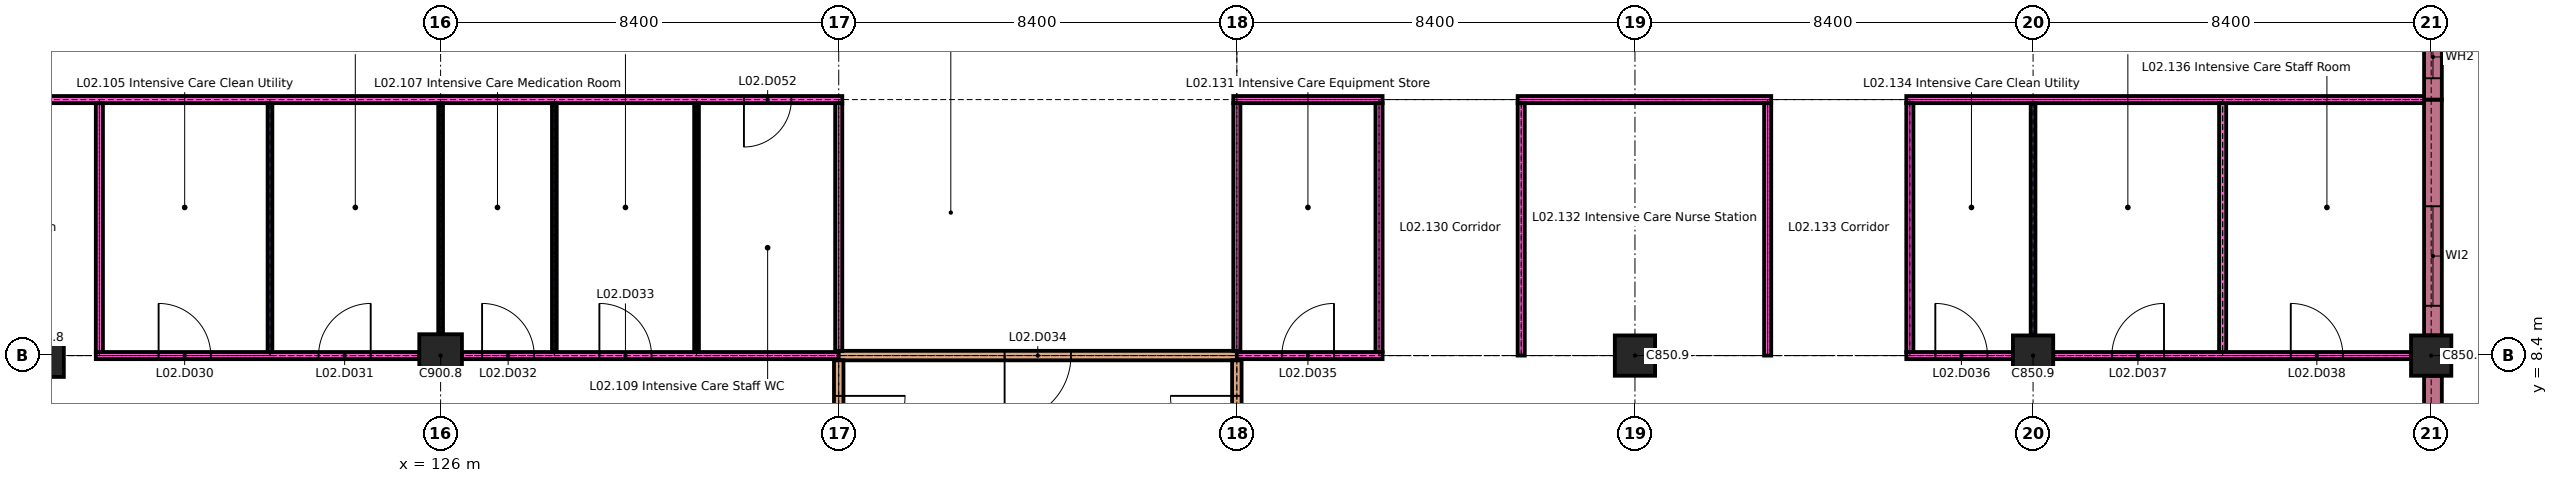
"""IFC4 building model, lengths in metres.
Left out: names, types, materials, properties, quantities, classifications, styles, units other than length and angle.
Written with IfcOpenShell. Run it as: python <this file> out.ifc"""

import sys

from ifc_helpers import new_model, si_unit, direction, frame, frame_2d, origin, origin_2d, place, context, subcontext, project, spatial, rectangle, extrude, element, fill, save


model = new_model("IFC4")
c1 = context("Model", 3, precision=1e-05, world=origin(), true_north=direction((0.0, 1.0)))
c2 = subcontext(c1, "Body", "Model", "MODEL_VIEW")
j1 = project(units=[si_unit("LENGTHUNIT", "METRE"), si_unit("PLANEANGLEUNIT", "RADIAN")], contexts=[c1])
p1 = place(None, origin())
s1 = spatial("IfcSite", under=j1, at=p1, CompositionType="ELEMENT")
p2 = place(p1, origin())
s2 = spatial("IfcBuilding", under=s1, at=p2, CompositionType="ELEMENT")
p3 = place(p2, frame((0.0, 0.0, 8.4)))
s3 = spatial("IfcBuildingStorey", under=s2, at=p3, CompositionType="ELEMENT", Elevation=8.4)
for number, where, z_axis, x_axis in (
    (1, (117.6, 8.4, 0.0), (0.0, 0.0, 1.0), (1.0, 0.0, 0.0)),
    (2, (126.0, 8.4, 0.0), (0.0, 0.0, 1.0), (1.0, 0.0, 0.0)),
):
    element("IfcColumn", number, at=place(p3, frame(where, z_axis=z_axis, x_axis=x_axis)), inside=s3, PredefinedType="COLUMN", context=c2, shape_type="SweptSolid", body=[
        extrude(rectangle(XDim=0.9, YDim=0.9, at=origin_2d()), origin(), (0.0, 0.0, 1.0), 4.2),
    ])
for number, where, z_axis, x_axis in (
    (3, (151.2, 8.4, 0.0), (0.0, 0.0, 1.0), (1.0, 0.0, 0.0)),
    (4, (159.6, 8.4, 0.0), (0.0, 0.0, 1.0), (1.0, 0.0, 0.0)),
    (5, (168.0, 8.4, 0.0), (0.0, 0.0, 1.0), (1.0, 0.0, 0.0)),
):
    element("IfcColumn", number, at=place(p3, frame(where, z_axis=z_axis, x_axis=x_axis)), inside=s3, PredefinedType="COLUMN", context=c2, shape_type="SweptSolid", body=[
        extrude(rectangle(XDim=0.85, YDim=0.85, at=origin_2d()), origin(), (0.0, 0.0, 1.0), 4.2),
    ])
p4 = place(p3, frame((168.038, 5.4, 0.0), z_axis=(0.0, 0.0, 1.0), x_axis=(0.0, 1.0, 0.0)))
e6 = element("IfcWall", 6, at=p4, inside=s3, PredefinedType="SOLIDWALL", context=c2, shape_type="SweptSolid", body=[
    extrude(rectangle(XDim=2.575, YDim=0.375, at=frame_2d((1.288, 0.0))), origin(), (0.0, 0.0, 1.0), 3.9),
])
p5 = place(p4, frame((0.45, 0.0, 0.9)))
e7 = element("IfcOpeningElement", 7, at=p5, cuts=e6, PredefinedType="OPENING", context=c2, shape_type="SweptSolid", body=[
    extrude(rectangle(XDim=0.9, YDim=2.1, at=frame_2d((0.45, 1.05))), frame((0.0, 0.198, 0.0), z_axis=(0.0, -1.0, 0.0), x_axis=(1.0, 0.0, 0.0)), (0.0, 0.0, 1.0), 0.395),
])
p6 = place(p3, frame((168.038, 8.825, 0.0), z_axis=(0.0, 0.0, 1.0), x_axis=(0.0, 1.0, 0.0)))
e8 = element("IfcWall", 8, at=p6, inside=s3, PredefinedType="SOLIDWALL", context=c2, shape_type="SweptSolid", body=[
    extrude(rectangle(XDim=4.975, YDim=0.375, at=frame_2d((2.488, 0.0))), origin(), (0.0, 0.0, 1.0), 3.9),
])
p7 = place(p6, frame((0.625, 0.0, 0.9)))
e9 = element("IfcOpeningElement", 9, at=p7, cuts=e8, PredefinedType="OPENING", context=c2, shape_type="SweptSolid", body=[
    extrude(rectangle(XDim=2.1, YDim=2.1, at=frame_2d((1.05, 1.05))), frame((0.0, 0.198, 0.0), z_axis=(0.0, -1.0, 0.0), x_axis=(1.0, 0.0, 0.0)), (0.0, 0.0, 1.0), 0.395),
])
p8 = place(p3, frame((168.038, 13.8, 0.0), z_axis=(0.0, 0.0, 1.0), x_axis=(0.0, 1.0, 0.0)))
e10 = element("IfcWall", 10, at=p8, inside=s3, PredefinedType="SOLIDWALL", context=c2, shape_type="SweptSolid", body=[
    extrude(rectangle(XDim=3.0, YDim=0.375, at=frame_2d((1.5, 0.0))), origin(), (0.0, 0.0, 1.0), 3.9),
])
p9 = place(p8, frame((0.45, 0.0, 0.9)))
e11 = element("IfcOpeningElement", 11, at=p9, cuts=e10, PredefinedType="OPENING", context=c2, shape_type="SweptSolid", body=[
    extrude(rectangle(XDim=0.9, YDim=2.1, at=frame_2d((0.45, 1.05))), frame((0.0, 0.198, 0.0), z_axis=(0.0, -1.0, 0.0), x_axis=(1.0, 0.0, 0.0)), (0.0, 0.0, 1.0), 0.395),
])
p10 = place(p3, frame((118.725, 8.4, 0.0), z_axis=(0.0, 0.0, 1.0), x_axis=(1.0, 0.0, 0.0)))
e12 = element("IfcWall", 12, at=p10, inside=s3, PredefinedType="PARTITIONING", context=c2, shape_type="SweptSolid", body=[
    extrude(rectangle(XDim=6.825, YDim=0.15, at=frame_2d((3.413, 0.0))), origin(), (0.0, 0.0, 1.0), 4.2),
])
p11 = place(p10, frame((1.325, 0.0, 0.0)))
e13 = element("IfcOpeningElement", 13, at=p11, cuts=e12, PredefinedType="OPENING", context=c2, shape_type="SweptSolid", body=[
    extrude(rectangle(XDim=1.1, YDim=2.1, at=frame_2d((0.55, 1.05))), frame((0.0, 0.085, 0.0), z_axis=(0.0, -1.0, 0.0), x_axis=(1.0, 0.0, 0.0)), (0.0, 0.0, 1.0), 0.17),
])
p12 = place(p10, frame((4.7, 0.0, 0.0)))
e14 = element("IfcOpeningElement", 14, at=p12, cuts=e12, PredefinedType="OPENING", context=c2, shape_type="SweptSolid", body=[
    extrude(rectangle(XDim=1.1, YDim=2.1, at=frame_2d((0.55, 1.05))), frame((0.0, 0.085, 0.0), z_axis=(0.0, -1.0, 0.0), x_axis=(1.0, 0.0, 0.0)), (0.0, 0.0, 1.0), 0.17),
])
p13 = place(p3, frame((126.45, 8.4, 0.0), z_axis=(0.0, 0.0, 1.0), x_axis=(1.0, 0.0, 0.0)))
e15 = element("IfcWall", 15, at=p13, inside=s3, PredefinedType="PARTITIONING", context=c2, shape_type="SweptSolid", body=[
    extrude(rectangle(XDim=7.95, YDim=0.15, at=frame_2d((3.975, 0.0))), origin(), (0.0, 0.0, 1.0), 4.2),
])
p14 = place(p13, frame((0.425, 0.0, 0.0)))
e16 = element("IfcOpeningElement", 16, at=p14, cuts=e15, PredefinedType="OPENING", context=c2, shape_type="SweptSolid", body=[
    extrude(rectangle(XDim=1.1, YDim=2.1, at=frame_2d((0.55, 1.05))), frame((0.0, 0.085, 0.0), z_axis=(0.0, -1.0, 0.0), x_axis=(1.0, 0.0, 0.0)), (0.0, 0.0, 1.0), 0.17),
])
p15 = place(p13, frame((2.9, 0.0, 0.0)))
e17 = element("IfcOpeningElement", 17, at=p15, cuts=e15, PredefinedType="OPENING", context=c2, shape_type="SweptSolid", body=[
    extrude(rectangle(XDim=1.1, YDim=2.1, at=frame_2d((0.55, 1.05))), frame((0.0, 0.085, 0.0), z_axis=(0.0, -1.0, 0.0), x_axis=(1.0, 0.0, 0.0)), (0.0, 0.0, 1.0), 0.17),
])
p16 = place(p3, frame((134.4, 8.4, 0.0), z_axis=(0.0, 0.0, 1.0), x_axis=(1.0, 0.0, 0.0)))
e18 = element("IfcWall", 18, at=p16, inside=s3, PredefinedType="PARTITIONING", context=c2, shape_type="SweptSolid", body=[
    extrude(rectangle(XDim=8.4, YDim=0.2, at=frame_2d((4.2, 0.0))), origin(), (0.0, 0.0, 1.0), 4.2),
])
p17 = place(p16, frame((3.5, 0.0, 0.0)))
e19 = element("IfcOpeningElement", 19, at=p17, cuts=e18, PredefinedType="OPENING", context=c2, shape_type="SweptSolid", body=[
    extrude(rectangle(XDim=1.4, YDim=2.1, at=frame_2d((0.7, 1.05))), frame((0.0, 0.11, 0.0), z_axis=(0.0, -1.0, 0.0), x_axis=(1.0, 0.0, 0.0)), (0.0, 0.0, 1.0), 0.22),
])
p18 = place(p3, frame((142.8, 8.4, 0.0), z_axis=(0.0, 0.0, 1.0), x_axis=(1.0, 0.0, 0.0)))
e20 = element("IfcWall", 20, at=p18, inside=s3, PredefinedType="PARTITIONING", context=c2, shape_type="SweptSolid", body=[
    extrude(rectangle(XDim=3.075, YDim=0.15, at=frame_2d((1.538, 0.0))), origin(), (0.0, 0.0, 1.0), 4.2),
])
p19 = place(p18, frame((0.95, 0.0, 0.0)))
e21 = element("IfcOpeningElement", 21, at=p19, cuts=e20, PredefinedType="OPENING", context=c2, shape_type="SweptSolid", body=[
    extrude(rectangle(XDim=1.1, YDim=2.1, at=frame_2d((0.55, 1.05))), frame((0.0, 0.085, 0.0), z_axis=(0.0, -1.0, 0.0), x_axis=(1.0, 0.0, 0.0)), (0.0, 0.0, 1.0), 0.17),
])
p20 = place(p3, frame((156.925, 8.4, 0.0), z_axis=(0.0, 0.0, 1.0), x_axis=(1.0, 0.0, 0.0)))
e22 = element("IfcWall", 22, at=p20, inside=s3, PredefinedType="PARTITIONING", context=c2, shape_type="SweptSolid", body=[
    extrude(rectangle(XDim=2.25, YDim=0.15, at=frame_2d((1.125, 0.0))), origin(), (0.0, 0.0, 1.0), 4.2),
])
p21 = place(p20, frame((0.613, 0.0, 0.0)))
e23 = element("IfcOpeningElement", 23, at=p21, cuts=e22, PredefinedType="OPENING", context=c2, shape_type="SweptSolid", body=[
    extrude(rectangle(XDim=1.1, YDim=2.1, at=frame_2d((0.55, 1.05))), frame((0.0, 0.085, 0.0), z_axis=(0.0, -1.0, 0.0), x_axis=(1.0, 0.0, 0.0)), (0.0, 0.0, 1.0), 0.17),
])
p22 = place(p3, frame((160.025, 8.4, 0.0), z_axis=(0.0, 0.0, 1.0), x_axis=(1.0, 0.0, 0.0)))
e24 = element("IfcWall", 24, at=p22, inside=s3, PredefinedType="PARTITIONING", context=c2, shape_type="SweptSolid", body=[
    extrude(rectangle(XDim=7.55, YDim=0.15, at=frame_2d((3.775, 0.0))), origin(), (0.0, 0.0, 1.0), 4.2),
])
p23 = place(p22, frame((1.238, 0.0, 0.0)))
e25 = element("IfcOpeningElement", 25, at=p23, cuts=e24, PredefinedType="OPENING", context=c2, shape_type="SweptSolid", body=[
    extrude(rectangle(XDim=1.1, YDim=2.1, at=frame_2d((0.55, 1.05))), frame((0.0, 0.085, 0.0), z_axis=(0.0, -1.0, 0.0), x_axis=(1.0, 0.0, 0.0)), (0.0, 0.0, 1.0), 0.17),
])
p24 = place(p22, frame((5.012, 0.0, 0.0)))
e26 = element("IfcOpeningElement", 26, at=p24, cuts=e24, PredefinedType="OPENING", context=c2, shape_type="SweptSolid", body=[
    extrude(rectangle(XDim=1.1, YDim=2.1, at=frame_2d((0.55, 1.05))), frame((0.0, 0.085, 0.0), z_axis=(0.0, -1.0, 0.0), x_axis=(1.0, 0.0, 0.0)), (0.0, 0.0, 1.0), 0.17),
])
p25 = place(p3, frame((112.125, 13.8, 0.0), z_axis=(0.0, 0.0, 1.0), x_axis=(1.0, 0.0, 0.0)))
e27 = element("IfcWall", 27, at=p25, inside=s3, PredefinedType="PARTITIONING", context=c2, shape_type="SweptSolid", body=[
    extrude(rectangle(XDim=22.35, YDim=0.15, at=frame_2d((11.175, 0.0))), origin(), (0.0, 0.0, 1.0), 4.2),
])
p26 = place(p25, frame((20.275, 0.0, 0.0)))
e28 = element("IfcOpeningElement", 28, at=p26, cuts=e27, PredefinedType="OPENING", context=c2, shape_type="SweptSolid", body=[
    extrude(rectangle(XDim=1.0, YDim=2.1, at=frame_2d((0.5, 1.05))), frame((0.0, 0.085, 0.0), z_axis=(0.0, -1.0, 0.0), x_axis=(1.0, 0.0, 0.0)), (0.0, 0.0, 1.0), 0.17),
])
p27 = place(p3, frame((142.725, 13.8, 0.0), z_axis=(0.0, 0.0, 1.0), x_axis=(1.0, 0.0, 0.0)))
e29 = element("IfcWall", 29, at=p27, inside=s3, PredefinedType="PARTITIONING", context=c2, shape_type="SweptSolid", body=[
    extrude(rectangle(XDim=3.15, YDim=0.15, at=frame_2d((1.575, 0.0))), origin(), (0.0, 0.0, 1.0), 4.2),
])
p28 = place(p3, frame((148.725, 13.8, 0.0), z_axis=(0.0, 0.0, 1.0), x_axis=(1.0, 0.0, 0.0)))
e30 = element("IfcWall", 30, at=p28, inside=s3, PredefinedType="PARTITIONING", context=c2, shape_type="SweptSolid", body=[
    extrude(rectangle(XDim=5.35, YDim=0.15, at=frame_2d((2.675, 0.0))), origin(), (0.0, 0.0, 1.0), 4.2),
])
p29 = place(p3, frame((156.925, 13.8, 0.0), z_axis=(0.0, 0.0, 1.0), x_axis=(1.0, 0.0, 0.0)))
e31 = element("IfcWall", 31, at=p29, inside=s3, PredefinedType="PARTITIONING", context=c2, shape_type="SweptSolid", body=[
    extrude(rectangle(XDim=10.925, YDim=0.15, at=frame_2d((5.462, 0.0))), origin(), (0.0, 0.0, 1.0), 4.2),
])
p30 = place(p3, frame((118.8, 8.475, 0.0), z_axis=(0.0, 0.0, 1.0), x_axis=(0.0, 1.0, 0.0)))
e32 = element("IfcWall", 32, at=p30, inside=s3, PredefinedType="PARTITIONING", context=c2, shape_type="SweptSolid", body=[
    extrude(rectangle(XDim=5.25, YDim=0.15, at=frame_2d((2.625, 0.0))), origin(), (0.0, 0.0, 1.0), 4.2),
])
p31 = place(p3, frame((122.4, 8.475, 0.0), z_axis=(0.0, 0.0, 1.0), x_axis=(0.0, 1.0, 0.0)))
e33 = element("IfcWall", 33, at=p31, inside=s3, PredefinedType="PARTITIONING", context=c2, shape_type="SweptSolid", body=[
    extrude(rectangle(XDim=5.25, YDim=0.1, at=frame_2d((2.625, 0.0))), origin(), (0.0, 0.0, 1.0), 4.2),
])
p32 = place(p3, frame((126.0, 8.85, 0.0), z_axis=(0.0, 0.0, 1.0), x_axis=(0.0, 1.0, 0.0)))
e34 = element("IfcWall", 34, at=p32, inside=s3, PredefinedType="PARTITIONING", context=c2, shape_type="SweptSolid", body=[
    extrude(rectangle(XDim=4.875, YDim=0.1, at=frame_2d((2.438, 0.0))), origin(), (0.0, 0.0, 1.0), 4.2),
])
for number, where, z_axis, x_axis in (
    (35, (128.4, 8.475, 0.0), (0.0, 0.0, 1.0), (0.0, 1.0, 0.0)),
    (36, (131.4, 8.475, 0.0), (0.0, 0.0, 1.0), (0.0, 1.0, 0.0)),
):
    element("IfcWall", number, at=place(p3, frame(where, z_axis=z_axis, x_axis=x_axis)), inside=s3, PredefinedType="PARTITIONING", context=c2, shape_type="SweptSolid", body=[
        extrude(rectangle(XDim=5.25, YDim=0.1, at=frame_2d((2.625, 0.0))), origin(), (0.0, 0.0, 1.0), 4.2),
    ])
p33 = place(p3, frame((134.4, 3.6, 0.0), z_axis=(0.0, 0.0, 1.0), x_axis=(0.0, 1.0, 0.0)))
e37 = element("IfcWall", 37, at=p33, inside=s3, PredefinedType="PARTITIONING", context=c2, shape_type="SweptSolid", body=[
    extrude(rectangle(XDim=4.7, YDim=0.2, at=frame_2d((2.35, 0.0))), origin(), (0.0, 0.0, 1.0), 4.2),
])
p34 = place(p33, frame((2.55, 0.0, 0.0)))
e38 = element("IfcOpeningElement", 38, at=p34, cuts=e37, PredefinedType="OPENING", context=c2, shape_type="SweptSolid", body=[
    extrude(rectangle(XDim=1.4, YDim=2.1, at=frame_2d((0.7, 1.05))), frame((0.0, 0.11, 0.0), z_axis=(0.0, -1.0, 0.0), x_axis=(1.0, 0.0, 0.0)), (0.0, 0.0, 1.0), 0.22),
])
p35 = place(p3, frame((134.4, 8.5, 0.0), z_axis=(0.0, 0.0, 1.0), x_axis=(0.0, 1.0, 0.0)))
e39 = element("IfcWall", 39, at=p35, inside=s3, PredefinedType="PARTITIONING", context=c2, shape_type="SweptSolid", body=[
    extrude(rectangle(XDim=5.225, YDim=0.15, at=frame_2d((2.613, 0.0))), origin(), (0.0, 0.0, 1.0), 4.2),
])
p36 = place(p3, frame((142.8, 3.6, 0.0), z_axis=(0.0, 0.0, 1.0), x_axis=(0.0, 1.0, 0.0)))
e40 = element("IfcWall", 40, at=p36, inside=s3, PredefinedType="PARTITIONING", context=c2, shape_type="SweptSolid", body=[
    extrude(rectangle(XDim=4.7, YDim=0.2, at=frame_2d((2.35, 0.0))), origin(), (0.0, 0.0, 1.0), 4.2),
])
p37 = place(p36, frame((2.55, 0.0, 0.0)))
e41 = element("IfcOpeningElement", 41, at=p37, cuts=e40, PredefinedType="OPENING", context=c2, shape_type="SweptSolid", body=[
    extrude(rectangle(XDim=1.4, YDim=2.1, at=frame_2d((0.7, 1.05))), frame((0.0, 0.11, 0.0), z_axis=(0.0, -1.0, 0.0), x_axis=(1.0, 0.0, 0.0)), (0.0, 0.0, 1.0), 0.22),
])
p38 = place(p3, frame((142.8, 8.5, 0.0), z_axis=(0.0, 0.0, 1.0), x_axis=(0.0, 1.0, 0.0)))
e42 = element("IfcWall", 42, at=p38, inside=s3, PredefinedType="PARTITIONING", context=c2, shape_type="SweptSolid", body=[
    extrude(rectangle(XDim=5.225, YDim=0.15, at=frame_2d((2.613, 0.0))), origin(), (0.0, 0.0, 1.0), 4.2),
])
p39 = place(p3, frame((145.8, 8.475, 0.0), z_axis=(0.0, 0.0, 1.0), x_axis=(0.0, 1.0, 0.0)))
e43 = element("IfcWall", 43, at=p39, inside=s3, PredefinedType="PARTITIONING", context=c2, shape_type="SweptSolid", body=[
    extrude(rectangle(XDim=5.25, YDim=0.15, at=frame_2d((2.625, 0.0))), origin(), (0.0, 0.0, 1.0), 4.2),
])
for number, where, z_axis, x_axis in (
    (44, (148.8, 8.4, 0.0), (0.0, 0.0, 1.0), (0.0, 1.0, 0.0)),
    (45, (154.0, 8.4, 0.0), (0.0, 0.0, 1.0), (0.0, 1.0, 0.0)),
):
    element("IfcWall", number, at=place(p3, frame(where, z_axis=z_axis, x_axis=x_axis)), inside=s3, PredefinedType="PARTITIONING", context=c2, shape_type="SweptSolid", body=[
        extrude(rectangle(XDim=5.325, YDim=0.15, at=frame_2d((2.663, 0.0))), origin(), (0.0, 0.0, 1.0), 4.2),
    ])
p40 = place(p3, frame((157.0, 8.475, 0.0), z_axis=(0.0, 0.0, 1.0), x_axis=(0.0, 1.0, 0.0)))
e46 = element("IfcWall", 46, at=p40, inside=s3, PredefinedType="PARTITIONING", context=c2, shape_type="SweptSolid", body=[
    extrude(rectangle(XDim=5.25, YDim=0.15, at=frame_2d((2.625, 0.0))), origin(), (0.0, 0.0, 1.0), 4.2),
])
p41 = place(p3, frame((159.6, 8.825, 0.0), z_axis=(0.0, 0.0, 1.0), x_axis=(0.0, 1.0, 0.0)))
e47 = element("IfcWall", 47, at=p41, inside=s3, PredefinedType="PARTITIONING", context=c2, shape_type="SweptSolid", body=[
    extrude(rectangle(XDim=4.9, YDim=0.1, at=frame_2d((2.45, 0.0))), origin(), (0.0, 0.0, 1.0), 4.2),
])
p42 = place(p3, frame((163.6, 8.475, 0.0), z_axis=(0.0, 0.0, 1.0), x_axis=(0.0, 1.0, 0.0)))
e48 = element("IfcWall", 48, at=p42, inside=s3, PredefinedType="PARTITIONING", context=c2, shape_type="SweptSolid", body=[
    extrude(rectangle(XDim=5.25, YDim=0.15, at=frame_2d((2.625, 0.0))), origin(), (0.0, 0.0, 1.0), 4.2),
])
p43 = place(p7, origin())
e49 = element("IfcWindow", 49, at=p43, inside=s3, PartitioningType="SINGLE_PANEL", PredefinedType="WINDOW", context=c2, shape_type="SweptSolid", body=[
    extrude(rectangle(XDim=2.1, YDim=2.1, at=frame_2d((1.05, 1.05))), frame((0.0, 0.045, 0.0), z_axis=(0.0, -1.0, 0.0), x_axis=(1.0, 0.0, 0.0)), (0.0, 0.0, 1.0), 0.09),
])
fill(e9, e49)
p44 = place(p9, origin())
e50 = element("IfcWindow", 50, at=p44, inside=s3, PartitioningType="SINGLE_PANEL", PredefinedType="WINDOW", context=c2, shape_type="SweptSolid", body=[
    extrude(rectangle(XDim=0.9, YDim=2.1, at=frame_2d((0.45, 1.05))), frame((0.0, 0.03, 0.0), z_axis=(0.0, -1.0, 0.0), x_axis=(1.0, 0.0, 0.0)), (0.0, 0.0, 1.0), 0.06),
])
fill(e11, e50)
p45 = place(p11, origin())
e51 = element("IfcDoor", 51, at=p45, inside=s3, OperationType="SINGLE_SWING_RIGHT", PredefinedType="DOOR", context=c2, shape_type="SweptSolid", body=[
    extrude(rectangle(XDim=1.1, YDim=2.1, at=frame_2d((0.55, 1.05))), frame((0.0, 0.025, 0.0), z_axis=(0.0, -1.0, 0.0), x_axis=(1.0, 0.0, 0.0)), (0.0, 0.0, 1.0), 0.05),
])
fill(e13, e51)
p46 = place(p12, origin())
e52 = element("IfcDoor", 52, at=p46, inside=s3, OperationType="SINGLE_SWING_LEFT", PredefinedType="DOOR", context=c2, shape_type="SweptSolid", body=[
    extrude(rectangle(XDim=1.1, YDim=2.1, at=frame_2d((0.55, 1.05))), frame((0.0, 0.025, 0.0), z_axis=(0.0, -1.0, 0.0), x_axis=(1.0, 0.0, 0.0)), (0.0, 0.0, 1.0), 0.05),
])
fill(e14, e52)
p47 = place(p14, origin())
e53 = element("IfcDoor", 53, at=p47, inside=s3, OperationType="SINGLE_SWING_RIGHT", PredefinedType="DOOR", context=c2, shape_type="SweptSolid", body=[
    extrude(rectangle(XDim=1.1, YDim=2.1, at=frame_2d((0.55, 1.05))), frame((0.0, 0.025, 0.0), z_axis=(0.0, -1.0, 0.0), x_axis=(1.0, 0.0, 0.0)), (0.0, 0.0, 1.0), 0.05),
])
fill(e16, e53)
p48 = place(p15, origin())
e54 = element("IfcDoor", 54, at=p48, inside=s3, OperationType="SINGLE_SWING_RIGHT", PredefinedType="DOOR", context=c2, shape_type="SweptSolid", body=[
    extrude(rectangle(XDim=1.1, YDim=2.1, at=frame_2d((0.55, 1.05))), frame((0.0, 0.025, 0.0), z_axis=(0.0, -1.0, 0.0), x_axis=(1.0, 0.0, 0.0)), (0.0, 0.0, 1.0), 0.05),
])
fill(e17, e54)
p49 = place(p17, origin())
e55 = element("IfcDoor", 55, at=p49, inside=s3, OperationType="SINGLE_SWING_LEFT", PredefinedType="DOOR", context=c2, shape_type="SweptSolid", body=[
    extrude(rectangle(XDim=1.4, YDim=2.1, at=frame_2d((0.7, 1.05))), frame((0.0, 0.025, 0.0), z_axis=(0.0, -1.0, 0.0), x_axis=(1.0, 0.0, 0.0)), (0.0, 0.0, 1.0), 0.05),
])
fill(e19, e55)
p50 = place(p19, origin())
e56 = element("IfcDoor", 56, at=p50, inside=s3, OperationType="SINGLE_SWING_LEFT", PredefinedType="DOOR", context=c2, shape_type="SweptSolid", body=[
    extrude(rectangle(XDim=1.1, YDim=2.1, at=frame_2d((0.55, 1.05))), frame((0.0, 0.025, 0.0), z_axis=(0.0, -1.0, 0.0), x_axis=(1.0, 0.0, 0.0)), (0.0, 0.0, 1.0), 0.05),
])
fill(e21, e56)
p51 = place(p21, origin())
e57 = element("IfcDoor", 57, at=p51, inside=s3, OperationType="SINGLE_SWING_RIGHT", PredefinedType="DOOR", context=c2, shape_type="SweptSolid", body=[
    extrude(rectangle(XDim=1.1, YDim=2.1, at=frame_2d((0.55, 1.05))), frame((0.0, 0.025, 0.0), z_axis=(0.0, -1.0, 0.0), x_axis=(1.0, 0.0, 0.0)), (0.0, 0.0, 1.0), 0.05),
])
fill(e23, e57)
p52 = place(p23, origin())
e58 = element("IfcDoor", 58, at=p52, inside=s3, OperationType="SINGLE_SWING_LEFT", PredefinedType="DOOR", context=c2, shape_type="SweptSolid", body=[
    extrude(rectangle(XDim=1.1, YDim=2.1, at=frame_2d((0.55, 1.05))), frame((0.0, 0.025, 0.0), z_axis=(0.0, -1.0, 0.0), x_axis=(1.0, 0.0, 0.0)), (0.0, 0.0, 1.0), 0.05),
])
fill(e25, e58)
p53 = place(p24, origin())
e59 = element("IfcDoor", 59, at=p53, inside=s3, OperationType="SINGLE_SWING_RIGHT", PredefinedType="DOOR", context=c2, shape_type="SweptSolid", body=[
    extrude(rectangle(XDim=1.1, YDim=2.1, at=frame_2d((0.55, 1.05))), frame((0.0, 0.025, 0.0), z_axis=(0.0, -1.0, 0.0), x_axis=(1.0, 0.0, 0.0)), (0.0, 0.0, 1.0), 0.05),
])
fill(e26, e59)
p54 = place(p26, origin())
e60 = element("IfcDoor", 60, at=p54, inside=s3, OperationType="SINGLE_SWING_LEFT", PredefinedType="DOOR", context=c2, shape_type="SweptSolid", body=[
    extrude(rectangle(XDim=1.0, YDim=2.1, at=frame_2d((0.5, 1.05))), frame((0.0, 0.025, 0.0), z_axis=(0.0, -1.0, 0.0), x_axis=(1.0, 0.0, 0.0)), (0.0, 0.0, 1.0), 0.05),
])
fill(e28, e60)
p55 = place(p34, origin())
e61 = element("IfcDoor", 61, at=p55, inside=s3, OperationType="SINGLE_SWING_RIGHT", PredefinedType="DOOR", context=c2, shape_type="SweptSolid", body=[
    extrude(rectangle(XDim=1.4, YDim=2.1, at=frame_2d((0.7, 1.05))), frame((0.0, 0.03, 0.0), z_axis=(0.0, -1.0, 0.0), x_axis=(1.0, 0.0, 0.0)), (0.0, 0.0, 1.0), 0.06),
])
fill(e38, e61)
p56 = place(p37, origin())
e62 = element("IfcDoor", 62, at=p56, inside=s3, OperationType="SINGLE_SWING_LEFT", PredefinedType="DOOR", context=c2, shape_type="SweptSolid", body=[
    extrude(rectangle(XDim=1.4, YDim=2.1, at=frame_2d((0.7, 1.05))), frame((0.0, 0.03, 0.0), z_axis=(0.0, -1.0, 0.0), x_axis=(1.0, 0.0, 0.0)), (0.0, 0.0, 1.0), 0.06),
])
fill(e41, e62)
save(model, sys.argv[1])
